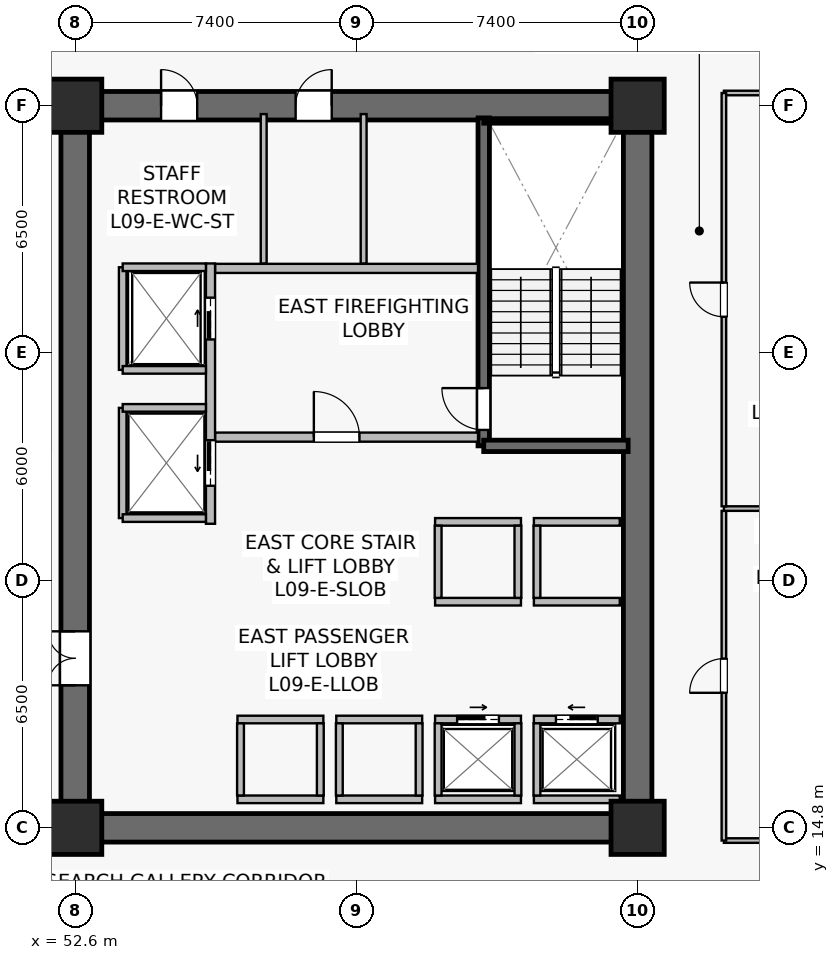
"""IFC4 building model, lengths in metres.
Left out: names, types, materials, properties, quantities, classifications, styles, units other than length and angle.
Written with IfcOpenShell. Run it as: python <this file> out.ifc"""

import sys

from ifc_helpers import new_model, si_unit, direction, frame, frame_2d, origin, origin_2d, place, context, subcontext, project, spatial, rectangle, extrude, source, transform, mapped, element, fill, save


model = new_model("IFC4")
c1 = context("Model", 3, precision=1e-05, world=origin(), true_north=direction((0.0, 1.0)))
c2 = subcontext(c1, "Body", "Model", "MODEL_VIEW")
j1 = project(units=[si_unit("LENGTHUNIT", "METRE"), si_unit("PLANEANGLEUNIT", "RADIAN")], contexts=[c1])
p1 = place(None, origin())
s1 = spatial("IfcSite", under=j1, at=p1, CompositionType="ELEMENT")
p2 = place(p1, origin())
s2 = spatial("IfcBuilding", under=s1, at=p2, CompositionType="ELEMENT")
p3 = place(p2, frame((0.0, 0.0, 37.5)))
s3 = spatial("IfcBuildingStorey", under=s2, at=p3, CompositionType="ELEMENT", Elevation=37.5)
p4 = place(p3, frame((52.225, 14.8, 0.0), z_axis=(0.0, 0.0, 1.0), x_axis=(1.0, 0.0, 0.0)))
e1 = element("IfcWall", 1, at=p4, inside=s3, PredefinedType="SHEAR", context=c2, shape_type="SweptSolid", body=[
    extrude(rectangle(XDim=15.55, YDim=0.75, at=frame_2d((7.775, 0.0))), origin(), (0.0, 0.0, 1.0), 3.78),
])
p5 = place(p3, frame((52.225, 33.8, 0.0), z_axis=(0.0, 0.0, 1.0), x_axis=(1.0, 0.0, 0.0)))
e2 = element("IfcWall", 2, at=p5, inside=s3, PredefinedType="SHEAR", context=c2, shape_type="SweptSolid", body=[
    extrude(rectangle(XDim=15.55, YDim=0.75, at=frame_2d((7.775, 0.0))), origin(), (0.0, 0.0, 1.0), 3.78),
])
p6 = place(p5, frame((6.175, 0.0, 0.0)))
e3 = element("IfcOpeningElement", 3, at=p6, cuts=e2, PredefinedType="OPENING", context=c2, shape_type="SweptSolid", body=[
    extrude(rectangle(XDim=0.95, YDim=2.15, at=frame_2d((0.475, 1.075))), frame((0.0, 0.385, 0.0), z_axis=(0.0, -1.0, 0.0), x_axis=(1.0, 0.0, 0.0)), (0.0, 0.0, 1.0), 0.77),
])
p7 = place(p5, frame((2.635, 0.0, 0.0)))
e4 = element("IfcOpeningElement", 4, at=p7, cuts=e2, PredefinedType="OPENING", context=c2, shape_type="SweptSolid", body=[
    extrude(rectangle(XDim=0.95, YDim=2.15, at=frame_2d((0.475, 1.075))), frame((0.0, 0.385, 0.0), z_axis=(0.0, -1.0, 0.0), x_axis=(1.0, 0.0, 0.0)), (0.0, 0.0, 1.0), 0.77),
])
p8 = place(p3, frame((52.6, 15.175, 0.0), z_axis=(0.0, 0.0, 1.0), x_axis=(0.0, 1.0, 0.0)))
e5 = element("IfcWall", 5, at=p8, inside=s3, PredefinedType="SHEAR", context=c2, shape_type="SweptSolid", body=[
    extrude(rectangle(XDim=18.25, YDim=0.75, at=frame_2d((9.125, 0.0))), origin(), (0.0, 0.0, 1.0), 3.78),
])
p9 = place(p8, frame((3.375, 0.0, 0.0)))
e6 = element("IfcOpeningElement", 6, at=p9, cuts=e5, PredefinedType="OPENING", context=c2, shape_type="SweptSolid", body=[
    extrude(rectangle(XDim=1.42, YDim=2.2, at=frame_2d((0.71, 1.1))), frame((0.0, 0.385, 0.0), z_axis=(0.0, -1.0, 0.0), x_axis=(1.0, 0.0, 0.0)), (0.0, 0.0, 1.0), 0.77),
])
p10 = place(p3, frame((67.4, 15.175, 0.0), z_axis=(0.0, 0.0, 1.0), x_axis=(0.0, 1.0, 0.0)))
e7 = element("IfcWall", 7, at=p10, inside=s3, PredefinedType="SHEAR", context=c2, shape_type="SweptSolid", body=[
    extrude(rectangle(XDim=18.25, YDim=0.75, at=frame_2d((9.125, 0.0))), origin(), (0.0, 0.0, 1.0), 3.78),
])
p11 = place(p3, frame((63.35, 24.85, 0.0), z_axis=(0.0, 0.0, 1.0), x_axis=(0.0, 1.0, 0.0)))
e8 = element("IfcWall", 8, at=p11, inside=s3, PredefinedType="SHEAR", context=c2, shape_type="SweptSolid", body=[
    extrude(rectangle(XDim=8.63, YDim=0.3, at=frame_2d((4.315, 0.0))), origin(), (0.0, 0.0, 1.0), 3.78),
])
p12 = place(p11, frame((0.42, 0.0, 0.0)))
e9 = element("IfcOpeningElement", 9, at=p12, cuts=e8, PredefinedType="OPENING", context=c2, shape_type="SweptSolid", body=[
    extrude(rectangle(XDim=1.1, YDim=2.15, at=frame_2d((0.55, 1.075))), frame((0.0, 0.16, 0.0), z_axis=(0.0, -1.0, 0.0), x_axis=(1.0, 0.0, 0.0)), (0.0, 0.0, 1.0), 0.32),
])
p13 = place(p3, frame((63.35, 24.85, 0.0), z_axis=(0.0, 0.0, 1.0), x_axis=(1.0, 0.0, 0.0)))
e10 = element("IfcWall", 10, at=p13, inside=s3, PredefinedType="SHEAR", context=c2, shape_type="SweptSolid", body=[
    extrude(rectangle(XDim=3.8, YDim=0.3, at=frame_2d((1.9, 0.0))), origin(), (0.0, 0.0, 1.0), 3.78),
])
p14 = place(p3, frame((63.35, 33.4, 0.0), z_axis=(0.0, 0.0, 1.0), x_axis=(1.0, 0.0, 0.0)))
e11 = element("IfcWall", 11, at=p14, inside=s3, PredefinedType="SOLIDWALL", context=c2, shape_type="SweptSolid", body=[
    extrude(rectangle(XDim=3.72, YDim=0.12, at=frame_2d((1.86, 0.0))), origin(), (0.0, 0.0, 1.0), 3.78),
])
m1 = source(origin(), c2, "Body", "SweptSolid", [
    extrude(rectangle(XDim=1.4, YDim=1.4, at=origin_2d()), origin(), (0.0, 0.0, 1.0), 4.1),
])
for number, where, z_axis, x_axis in (
    (12, (52.6, 14.8, 0.0), (0.0, 0.0, 1.0), (1.0, 0.0, 0.0)),
    (13, (67.4, 14.8, 0.0), (0.0, 0.0, 1.0), (1.0, 0.0, 0.0)),
    (14, (52.6, 33.8, 0.0), (0.0, 0.0, 1.0), (1.0, 0.0, 0.0)),
    (15, (67.4, 33.8, 0.0), (0.0, 0.0, 1.0), (1.0, 0.0, 0.0)),
):
    element("IfcColumn", number, at=place(p3, frame(where, z_axis=z_axis, x_axis=x_axis)), inside=s3, PredefinedType="COLUMN", context=c2, shape_type="MappedRepresentation", body=[
        mapped(m1, transform((0.0, 0.0, 0.0), scale=1.0)),
    ])
p15 = place(p3, frame((56.28, 25.08, 0.0), z_axis=(0.0, 0.0, 1.0), x_axis=(1.0, 0.0, 0.0)))
e16 = element("IfcWall", 16, at=p15, inside=s3, PredefinedType="SOLIDWALL", context=c2, shape_type="SweptSolid", body=[
    extrude(rectangle(XDim=6.92, YDim=0.24, at=frame_2d((3.46, 0.0))), origin(), (0.0, 0.0, 1.0), 3.065),
])
p16 = place(p15, frame((2.6, 0.0, 0.0)))
e17 = element("IfcOpeningElement", 17, at=p16, cuts=e16, PredefinedType="OPENING", context=c2, shape_type="SweptSolid", body=[
    extrude(rectangle(XDim=1.2, YDim=2.16, at=frame_2d((0.6, 1.08))), frame((0.0, 0.13, 0.0), z_axis=(0.0, -1.0, 0.0), x_axis=(1.0, 0.0, 0.0)), (0.0, 0.0, 1.0), 0.26),
])
p17 = place(p3, frame((56.28, 29.52, 0.0), z_axis=(0.0, 0.0, 1.0), x_axis=(1.0, 0.0, 0.0)))
e18 = element("IfcWall", 18, at=p17, inside=s3, PredefinedType="SOLIDWALL", context=c2, shape_type="SweptSolid", body=[
    extrude(rectangle(XDim=6.92, YDim=0.24, at=frame_2d((3.46, 0.0))), origin(), (0.0, 0.0, 1.0), 3.065),
])
p18 = place(p3, frame((56.16, 22.8, 0.0), z_axis=(0.0, 0.0, 1.0), x_axis=(0.0, 1.0, 0.0)))
e19 = element("IfcWall", 19, at=p18, inside=s3, PredefinedType="SOLIDWALL", context=c2, shape_type="SweptSolid", body=[
    extrude(rectangle(XDim=6.85, YDim=0.24, at=frame_2d((3.425, 0.0))), origin(), (0.0, 0.0, 1.0), 2.865),
])
p19 = place(p18, frame((4.85, 0.0, 0.0)))
e20 = element("IfcOpeningElement", 20, at=p19, cuts=e19, PredefinedType="OPENING", context=c2, shape_type="SweptSolid", body=[
    extrude(rectangle(XDim=1.1, YDim=2.22, at=frame_2d((0.55, 1.11))), frame((0.0, 0.13, 0.0), z_axis=(0.0, -1.0, 0.0), x_axis=(1.0, 0.0, 0.0)), (0.0, 0.0, 1.0), 0.26),
])
p20 = place(p18, frame((1.0, 0.0, 0.0)))
e21 = element("IfcOpeningElement", 21, at=p20, cuts=e19, PredefinedType="OPENING", context=c2, shape_type="SweptSolid", body=[
    extrude(rectangle(XDim=1.2, YDim=2.22, at=frame_2d((0.6, 1.11))), frame((0.0, 0.13, 0.0), z_axis=(0.0, -1.0, 0.0), x_axis=(1.0, 0.0, 0.0)), (0.0, 0.0, 1.0), 0.26),
])
p21 = place(p3, frame((64.67, 17.65, 0.0), z_axis=(0.0, 0.0, 1.0), x_axis=(1.0, 0.0, 0.0)))
e22 = element("IfcWall", 22, at=p21, inside=s3, PredefinedType="SOLIDWALL", context=c2, shape_type="SweptSolid", body=[
    extrude(rectangle(XDim=2.26, YDim=0.2, at=frame_2d((1.13, 0.0))), origin(), (0.0, 0.0, 1.0), 3.78),
])
p22 = place(p21, frame((0.58, 0.0, 0.0)))
e23 = element("IfcOpeningElement", 23, at=p22, cuts=e22, PredefinedType="OPENING", context=c2, shape_type="SweptSolid", body=[
    extrude(rectangle(XDim=1.1, YDim=2.22, at=frame_2d((0.55, 1.11))), frame((0.0, 0.11, 0.0), z_axis=(0.0, -1.0, 0.0), x_axis=(1.0, 0.0, 0.0)), (0.0, 0.0, 1.0), 0.22),
])
p23 = place(p3, frame((64.67, 15.55, 0.0), z_axis=(0.0, 0.0, 1.0), x_axis=(1.0, 0.0, 0.0)))
e24 = element("IfcWall", 24, at=p23, inside=s3, PredefinedType="SOLIDWALL", context=c2, shape_type="SweptSolid", body=[
    extrude(rectangle(XDim=2.26, YDim=0.2, at=frame_2d((1.13, 0.0))), origin(), (0.0, 0.0, 1.0), 3.78),
])
p24 = place(p3, frame((64.75, 15.65, 0.0), z_axis=(0.0, 0.0, 1.0), x_axis=(0.0, 1.0, 0.0)))
e25 = element("IfcWall", 25, at=p24, inside=s3, PredefinedType="SOLIDWALL", context=c2, shape_type="SweptSolid", body=[
    extrude(rectangle(XDim=1.9, YDim=0.18, at=frame_2d((0.95, 0.0))), origin(), (0.0, 0.0, 1.0), 3.78),
])
p25 = place(p3, frame((62.07, 17.65, 0.0), z_axis=(0.0, 0.0, 1.0), x_axis=(1.0, 0.0, 0.0)))
e26 = element("IfcWall", 26, at=p25, inside=s3, PredefinedType="SOLIDWALL", context=c2, shape_type="SweptSolid", body=[
    extrude(rectangle(XDim=2.26, YDim=0.2, at=frame_2d((1.13, 0.0))), origin(), (0.0, 0.0, 1.0), 3.78),
])
p26 = place(p25, frame((0.58, 0.0, 0.0)))
e27 = element("IfcOpeningElement", 27, at=p26, cuts=e26, PredefinedType="OPENING", context=c2, shape_type="SweptSolid", body=[
    extrude(rectangle(XDim=1.1, YDim=2.22, at=frame_2d((0.55, 1.11))), frame((0.0, 0.11, 0.0), z_axis=(0.0, -1.0, 0.0), x_axis=(1.0, 0.0, 0.0)), (0.0, 0.0, 1.0), 0.22),
])
p27 = place(p3, frame((62.07, 15.55, 0.0), z_axis=(0.0, 0.0, 1.0), x_axis=(1.0, 0.0, 0.0)))
e28 = element("IfcWall", 28, at=p27, inside=s3, PredefinedType="SOLIDWALL", context=c2, shape_type="SweptSolid", body=[
    extrude(rectangle(XDim=2.26, YDim=0.2, at=frame_2d((1.13, 0.0))), origin(), (0.0, 0.0, 1.0), 3.78),
])
for number, where, z_axis, x_axis in (
    (29, (62.15, 15.65, 0.0), (0.0, 0.0, 1.0), (0.0, 1.0, 0.0)),
    (30, (64.25, 15.65, 0.0), (0.0, 0.0, 1.0), (0.0, 1.0, 0.0)),
):
    element("IfcWall", number, at=place(p3, frame(where, z_axis=z_axis, x_axis=x_axis)), inside=s3, PredefinedType="SOLIDWALL", context=c2, shape_type="SweptSolid", body=[
        extrude(rectangle(XDim=1.9, YDim=0.18, at=frame_2d((0.95, 0.0))), origin(), (0.0, 0.0, 1.0), 3.78),
    ])
for number, where, z_axis, x_axis in (
    (31, (59.47, 17.65, 0.0), (0.0, 0.0, 1.0), (1.0, 0.0, 0.0)),
    (32, (59.47, 15.55, 0.0), (0.0, 0.0, 1.0), (1.0, 0.0, 0.0)),
):
    element("IfcWall", number, at=place(p3, frame(where, z_axis=z_axis, x_axis=x_axis)), inside=s3, PredefinedType="SOLIDWALL", context=c2, shape_type="SweptSolid", body=[
        extrude(rectangle(XDim=2.26, YDim=0.2, at=frame_2d((1.13, 0.0))), origin(), (0.0, 0.0, 1.0), 3.065),
    ])
for number, where, z_axis, x_axis in (
    (33, (59.55, 15.65, 0.0), (0.0, 0.0, 1.0), (0.0, 1.0, 0.0)),
    (34, (61.65, 15.65, 0.0), (0.0, 0.0, 1.0), (0.0, 1.0, 0.0)),
):
    element("IfcWall", number, at=place(p3, frame(where, z_axis=z_axis, x_axis=x_axis)), inside=s3, PredefinedType="SOLIDWALL", context=c2, shape_type="SweptSolid", body=[
        extrude(rectangle(XDim=1.9, YDim=0.18, at=frame_2d((0.95, 0.0))), origin(), (0.0, 0.0, 1.0), 3.78),
    ])
for number, where, z_axis, x_axis in (
    (35, (56.87, 17.65, 0.0), (0.0, 0.0, 1.0), (1.0, 0.0, 0.0)),
    (36, (56.87, 15.55, 0.0), (0.0, 0.0, 1.0), (1.0, 0.0, 0.0)),
):
    element("IfcWall", number, at=place(p3, frame(where, z_axis=z_axis, x_axis=x_axis)), inside=s3, PredefinedType="SOLIDWALL", context=c2, shape_type="SweptSolid", body=[
        extrude(rectangle(XDim=2.26, YDim=0.2, at=frame_2d((1.13, 0.0))), origin(), (0.0, 0.0, 1.0), 3.78),
    ])
for number, where, z_axis, x_axis in (
    (37, (56.95, 15.65, 0.0), (0.0, 0.0, 1.0), (0.0, 1.0, 0.0)),
    (38, (59.05, 15.65, 0.0), (0.0, 0.0, 1.0), (0.0, 1.0, 0.0)),
):
    element("IfcWall", number, at=place(p3, frame(where, z_axis=z_axis, x_axis=x_axis)), inside=s3, PredefinedType="SOLIDWALL", context=c2, shape_type="SweptSolid", body=[
        extrude(rectangle(XDim=1.9, YDim=0.18, at=frame_2d((0.95, 0.0))), origin(), (0.0, 0.0, 1.0), 3.78),
    ])
for number, where, z_axis, x_axis in (
    (39, (64.67, 20.75, 0.0), (0.0, 0.0, 1.0), (1.0, 0.0, 0.0)),
    (40, (64.67, 22.85, 0.0), (0.0, 0.0, 1.0), (1.0, 0.0, 0.0)),
):
    element("IfcWall", number, at=place(p3, frame(where, z_axis=z_axis, x_axis=x_axis)), inside=s3, PredefinedType="SOLIDWALL", context=c2, shape_type="SweptSolid", body=[
        extrude(rectangle(XDim=2.26, YDim=0.2, at=frame_2d((1.13, 0.0))), origin(), (0.0, 0.0, 1.0), 3.78),
    ])
p28 = place(p3, frame((64.75, 20.85, 0.0), z_axis=(0.0, 0.0, 1.0), x_axis=(0.0, 1.0, 0.0)))
e41 = element("IfcWall", 41, at=p28, inside=s3, PredefinedType="SOLIDWALL", context=c2, shape_type="SweptSolid", body=[
    extrude(rectangle(XDim=1.9, YDim=0.18, at=frame_2d((0.95, 0.0))), origin(), (0.0, 0.0, 1.0), 3.78),
])
for number, where, z_axis, x_axis in (
    (42, (62.07, 20.75, 0.0), (0.0, 0.0, 1.0), (1.0, 0.0, 0.0)),
    (43, (62.07, 22.85, 0.0), (0.0, 0.0, 1.0), (1.0, 0.0, 0.0)),
):
    element("IfcWall", number, at=place(p3, frame(where, z_axis=z_axis, x_axis=x_axis)), inside=s3, PredefinedType="SOLIDWALL", context=c2, shape_type="SweptSolid", body=[
        extrude(rectangle(XDim=2.26, YDim=0.2, at=frame_2d((1.13, 0.0))), origin(), (0.0, 0.0, 1.0), 3.78),
    ])
for number, where, z_axis, x_axis in (
    (44, (62.15, 20.85, 0.0), (0.0, 0.0, 1.0), (0.0, 1.0, 0.0)),
    (45, (64.25, 20.85, 0.0), (0.0, 0.0, 1.0), (0.0, 1.0, 0.0)),
):
    element("IfcWall", number, at=place(p3, frame(where, z_axis=z_axis, x_axis=x_axis)), inside=s3, PredefinedType="SOLIDWALL", context=c2, shape_type="SweptSolid", body=[
        extrude(rectangle(XDim=1.9, YDim=0.18, at=frame_2d((0.95, 0.0))), origin(), (0.0, 0.0, 1.0), 3.78),
    ])
p29 = place(p3, frame((53.85, 26.85, 0.0), z_axis=(0.0, 0.0, 1.0), x_axis=(0.0, 1.0, 0.0)))
e46 = element("IfcWall", 46, at=p29, inside=s3, PredefinedType="SOLIDWALL", context=c2, shape_type="SweptSolid", body=[
    extrude(rectangle(XDim=2.7, YDim=0.2, at=frame_2d((1.35, 0.0))), origin(), (0.0, 0.0, 1.0), 3.78),
])
p30 = place(p3, frame((53.85, 29.55, 0.0), z_axis=(0.0, 0.0, 1.0), x_axis=(1.0, 0.0, 0.0)))
e47 = element("IfcWall", 47, at=p30, inside=s3, PredefinedType="SOLIDWALL", context=c2, shape_type="SweptSolid", body=[
    extrude(rectangle(XDim=2.19, YDim=0.2, at=frame_2d((1.095, 0.0))), origin(), (0.0, 0.0, 1.0), 3.78),
])
p31 = place(p3, frame((53.85, 26.85, 0.0), z_axis=(0.0, 0.0, 1.0), x_axis=(1.0, 0.0, 0.0)))
e48 = element("IfcWall", 48, at=p31, inside=s3, PredefinedType="SOLIDWALL", context=c2, shape_type="SweptSolid", body=[
    extrude(rectangle(XDim=2.19, YDim=0.2, at=frame_2d((1.095, 0.0))), origin(), (0.0, 0.0, 1.0), 3.177),
])
p32 = place(p3, frame((53.85, 22.95, 0.0), z_axis=(0.0, 0.0, 1.0), x_axis=(0.0, 1.0, 0.0)))
e49 = element("IfcWall", 49, at=p32, inside=s3, PredefinedType="SOLIDWALL", context=c2, shape_type="SweptSolid", body=[
    extrude(rectangle(XDim=2.9, YDim=0.2, at=frame_2d((1.45, 0.0))), origin(), (0.0, 0.0, 1.0), 2.865),
])
for number, where, z_axis, x_axis in (
    (50, (53.85, 25.85, 0.0), (0.0, 0.0, 1.0), (1.0, 0.0, 0.0)),
    (51, (53.85, 22.95, 0.0), (0.0, 0.0, 1.0), (1.0, 0.0, 0.0)),
):
    element("IfcWall", number, at=place(p3, frame(where, z_axis=z_axis, x_axis=x_axis)), inside=s3, PredefinedType="SOLIDWALL", context=c2, shape_type="SweptSolid", body=[
        extrude(rectangle(XDim=2.19, YDim=0.2, at=frame_2d((1.095, 0.0))), origin(), (0.0, 0.0, 1.0), 3.78),
    ])
p33 = place(p3, frame((60.19, 29.65, 0.0), z_axis=(0.0, 0.0, 1.0), x_axis=(0.0, 1.0, 0.0)))
e52 = element("IfcWall", 52, at=p33, inside=s3, PredefinedType="PLUMBINGWALL", context=c2, shape_type="SweptSolid", body=[
    extrude(rectangle(XDim=3.93, YDim=0.155, at=frame_2d((1.965, 0.0))), origin(), (0.0, 0.0, 1.0), 3.065),
])
p34 = place(p3, frame((57.56, 29.65, 0.0), z_axis=(0.0, 0.0, 1.0), x_axis=(0.0, 1.0, 0.0)))
e53 = element("IfcWall", 53, at=p34, inside=s3, PredefinedType="PLUMBINGWALL", context=c2, shape_type="SweptSolid", body=[
    extrude(rectangle(XDim=3.93, YDim=0.155, at=frame_2d((1.965, 0.0))), origin(), (0.0, 0.0, 1.0), 3.78),
])
for number, where, z_axis, x_axis in (
    (54, (69.67, 14.465, 0.0), (0.0, 0.0, 1.0), (1.0, 0.0, 0.0)),
    (55, (69.67, 34.135, 0.0), (0.0, 0.0, 1.0), (1.0, 0.0, 0.0)),
):
    element("IfcWall", number, at=place(p3, frame(where, z_axis=z_axis, x_axis=x_axis)), inside=s3, PredefinedType="PARTITIONING", context=c2, shape_type="SweptSolid", body=[
        extrude(rectangle(XDim=5.02, YDim=0.12, at=frame_2d((2.51, 0.0))), origin(), (0.0, 0.0, 1.0), 3.78),
    ])
p35 = place(p3, frame((69.67, 14.465, 0.0), z_axis=(0.0, 0.0, 1.0), x_axis=(0.0, 1.0, 0.0)))
e56 = element("IfcWall", 56, at=p35, inside=s3, PredefinedType="PARTITIONING", context=c2, shape_type="SweptSolid", body=[
    extrude(rectangle(XDim=8.675, YDim=0.12, at=frame_2d((4.337, 0.0))), origin(), (0.0, 0.0, 1.0), 3.78),
])
p36 = place(p35, frame((3.887, 0.0, 0.0)))
e57 = element("IfcOpeningElement", 57, at=p36, cuts=e56, PredefinedType="OPENING", context=c2, shape_type="SweptSolid", body=[
    extrude(rectangle(XDim=0.9, YDim=2.1, at=frame_2d((0.45, 1.05))), frame((0.0, 0.07, 0.0), z_axis=(0.0, -1.0, 0.0), x_axis=(1.0, 0.0, 0.0)), (0.0, 0.0, 1.0), 0.14),
])
p37 = place(p3, frame((69.67, 23.2, 0.0), z_axis=(0.0, 0.0, 1.0), x_axis=(1.0, 0.0, 0.0)))
e58 = element("IfcWall", 58, at=p37, inside=s3, PredefinedType="PARTITIONING", context=c2, shape_type="SweptSolid", body=[
    extrude(rectangle(XDim=5.02, YDim=0.12, at=frame_2d((2.51, 0.0))), origin(), (0.0, 0.0, 1.0), 3.78),
])
p38 = place(p3, frame((69.67, 23.26, 0.0), z_axis=(0.0, 0.0, 1.0), x_axis=(0.0, 1.0, 0.0)))
e59 = element("IfcWall", 59, at=p38, inside=s3, PredefinedType="PARTITIONING", context=c2, shape_type="SweptSolid", body=[
    extrude(rectangle(XDim=10.875, YDim=0.12, at=frame_2d((5.438, 0.0))), origin(), (0.0, 0.0, 1.0), 3.78),
])
p39 = place(p38, frame((4.988, 0.0, 0.0)))
e60 = element("IfcOpeningElement", 60, at=p39, cuts=e59, PredefinedType="OPENING", context=c2, shape_type="SweptSolid", body=[
    extrude(rectangle(XDim=0.9, YDim=2.1, at=frame_2d((0.45, 1.05))), frame((0.0, 0.07, 0.0), z_axis=(0.0, -1.0, 0.0), x_axis=(1.0, 0.0, 0.0)), (0.0, 0.0, 1.0), 0.14),
])
m2 = source(origin(), c2, "Body", "SweptSolid", [
    extrude(rectangle(XDim=1.1, YDim=2.15, at=frame_2d((0.55, 1.075))), frame((0.0, 0.025, 0.0), z_axis=(0.0, -1.0, 0.0), x_axis=(1.0, 0.0, 0.0)), (0.0, 0.0, 1.0), 0.05),
])
p40 = place(p12, origin())
e61 = element("IfcDoor", 61, at=p40, inside=s3, OperationType="SINGLE_SWING_RIGHT", PredefinedType="DOOR", context=c2, shape_type="MappedRepresentation", body=[
    mapped(m2, transform((0.0, 0.0, 0.0), scale=1.0)),
])
fill(e9, e61)
m3 = source(origin(), c2, "Body", "SweptSolid", [
    extrude(rectangle(XDim=1.2, YDim=2.16, at=frame_2d((0.6, 1.08))), frame((0.0, 0.025, 0.0), z_axis=(0.0, -1.0, 0.0), x_axis=(1.0, 0.0, 0.0)), (0.0, 0.0, 1.0), 0.05),
])
p41 = place(p16, origin())
e62 = element("IfcDoor", 62, at=p41, inside=s3, OperationType="SINGLE_SWING_LEFT", PredefinedType="DOOR", context=c2, shape_type="MappedRepresentation", body=[
    mapped(m3, transform((0.0, 0.0, 0.0), scale=1.0)),
])
fill(e17, e62)
m4 = source(origin(), c2, "Body", "SweptSolid", [
    extrude(rectangle(XDim=1.1, YDim=2.22, at=frame_2d((0.55, 1.11))), frame((0.0, 0.025, 0.0), z_axis=(0.0, -1.0, 0.0), x_axis=(1.0, 0.0, 0.0)), (0.0, 0.0, 1.0), 0.05),
])
p42 = place(p22, origin())
e63 = element("IfcDoor", 63, at=p42, inside=s3, OperationType="SLIDING_TO_LEFT", PredefinedType="USERDEFINED", context=c2, shape_type="MappedRepresentation", body=[
    mapped(m4, transform((0.0, 0.0, 0.0), scale=1.0)),
])
fill(e23, e63)
p43 = place(p26, origin())
e64 = element("IfcDoor", 64, at=p43, inside=s3, OperationType="SLIDING_TO_RIGHT", PredefinedType="USERDEFINED", context=c2, shape_type="MappedRepresentation", body=[
    mapped(m4, transform((0.0, 0.0, 0.0), scale=1.0)),
])
fill(e27, e64)
p44 = place(p19, origin())
e65 = element("IfcDoor", 65, at=p44, inside=s3, OperationType="SLIDING_TO_RIGHT", PredefinedType="USERDEFINED", context=c2, shape_type="MappedRepresentation", body=[
    mapped(m4, transform((0.0, 0.0, 0.0), scale=1.0)),
])
fill(e20, e65)
m5 = source(origin(), c2, "Body", "SweptSolid", [
    extrude(rectangle(XDim=1.2, YDim=2.22, at=frame_2d((0.6, 1.11))), frame((0.0, 0.025, 0.0), z_axis=(0.0, -1.0, 0.0), x_axis=(1.0, 0.0, 0.0)), (0.0, 0.0, 1.0), 0.05),
])
p45 = place(p20, origin())
e66 = element("IfcDoor", 66, at=p45, inside=s3, OperationType="SLIDING_TO_LEFT", PredefinedType="USERDEFINED", context=c2, shape_type="MappedRepresentation", body=[
    mapped(m5, transform((0.0, 0.0, 0.0), scale=1.0)),
])
fill(e21, e66)
m6 = source(origin(), c2, "Body", "SweptSolid", [
    extrude(rectangle(XDim=1.42, YDim=2.2, at=frame_2d((0.71, 1.1))), frame((0.0, 0.025, 0.0), z_axis=(0.0, -1.0, 0.0), x_axis=(1.0, 0.0, 0.0)), (0.0, 0.0, 1.0), 0.05),
])
p46 = place(p9, origin())
e67 = element("IfcDoor", 67, at=p46, inside=s3, OperationType="DOUBLE_DOOR_SINGLE_SWING", PredefinedType="DOOR", context=c2, shape_type="MappedRepresentation", body=[
    mapped(m6, transform((0.0, 0.0, 0.0), scale=1.0)),
])
fill(e6, e67)
m7 = source(origin(), c2, "Body", "SweptSolid", [
    extrude(rectangle(XDim=0.95, YDim=2.15, at=frame_2d((0.475, 1.075))), frame((0.0, 0.025, 0.0), z_axis=(0.0, -1.0, 0.0), x_axis=(1.0, 0.0, 0.0)), (0.0, 0.0, 1.0), 0.05),
])
p47 = place(p6, origin())
e68 = element("IfcDoor", 68, at=p47, inside=s3, OperationType="SINGLE_SWING_RIGHT", PredefinedType="DOOR", context=c2, shape_type="MappedRepresentation", body=[
    mapped(m7, transform((0.0, 0.0, 0.0), scale=1.0)),
])
fill(e3, e68)
p48 = place(p7, origin())
e69 = element("IfcDoor", 69, at=p48, inside=s3, OperationType="SINGLE_SWING_LEFT", PredefinedType="DOOR", context=c2, shape_type="MappedRepresentation", body=[
    mapped(m7, transform((0.0, 0.0, 0.0), scale=1.0)),
])
fill(e4, e69)
m8 = source(origin(), c2, "Body", "SweptSolid", [
    extrude(rectangle(XDim=0.9, YDim=2.1, at=frame_2d((0.45, 1.05))), frame((0.0, 0.025, 0.0), z_axis=(0.0, -1.0, 0.0), x_axis=(1.0, 0.0, 0.0)), (0.0, 0.0, 1.0), 0.05),
])
p49 = place(p36, origin())
e70 = element("IfcDoor", 70, at=p49, inside=s3, OperationType="SINGLE_SWING_LEFT", PredefinedType="DOOR", context=c2, shape_type="MappedRepresentation", body=[
    mapped(m8, transform((0.0, 0.0, 0.0), scale=1.0)),
])
fill(e57, e70)
p50 = place(p39, origin())
e71 = element("IfcDoor", 71, at=p50, inside=s3, OperationType="SINGLE_SWING_RIGHT", PredefinedType="DOOR", context=c2, shape_type="MappedRepresentation", body=[
    mapped(m8, transform((0.0, 0.0, 0.0), scale=1.0)),
])
fill(e60, e71)
save(model, sys.argv[1])
